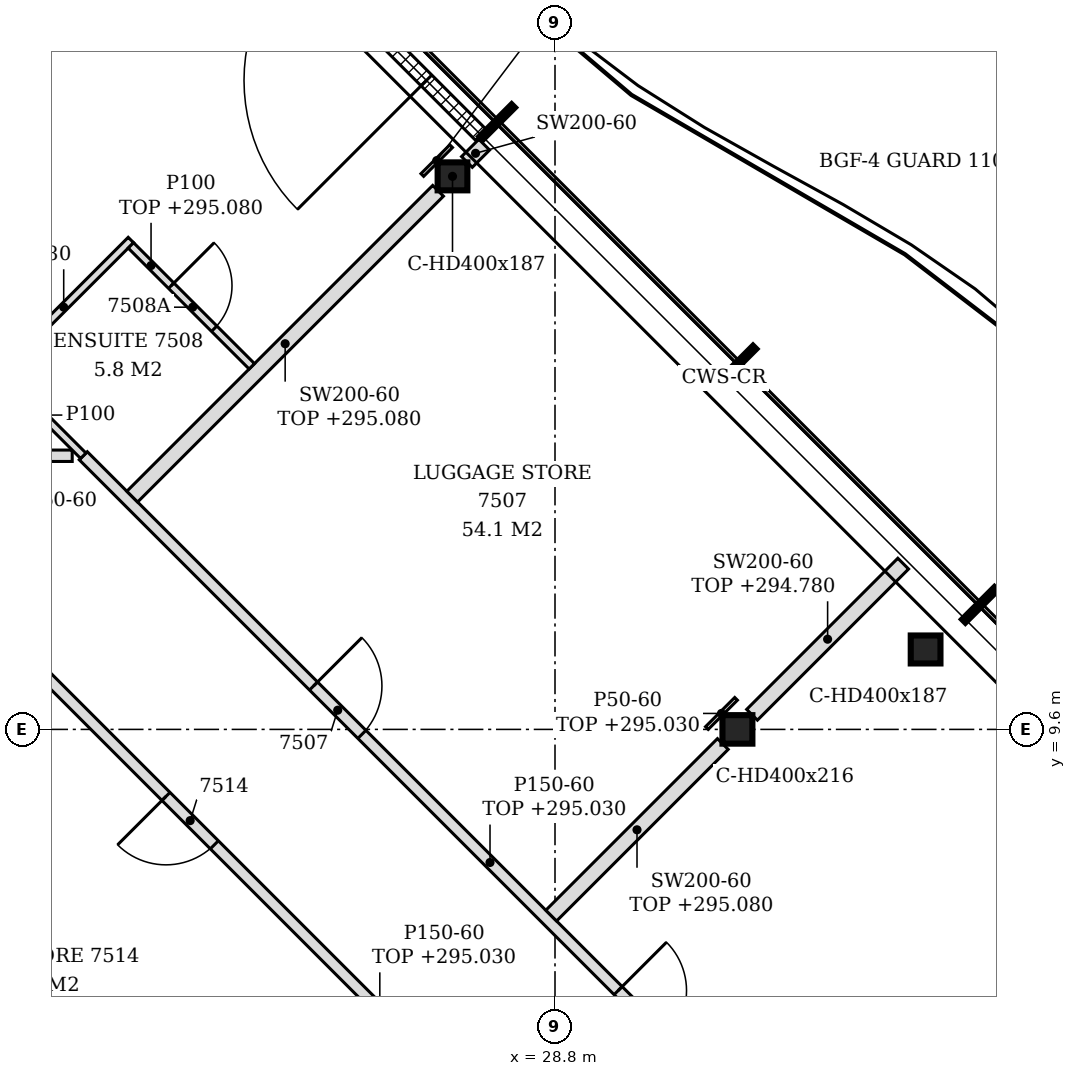
"""IFC4 building model, lengths in metres.
Left out: names, types, materials, properties, quantities, classifications, styles, units other than length and angle.
Written with IfcOpenShell. Run it as: python <this file> out.ifc"""

import sys

from ifc_helpers import new_model, si_unit, direction, frame, frame_2d, origin, origin_2d, place, context, subcontext, project, spatial, rectangle, i_section, extrude, element, fill, save


model = new_model("IFC4")
c1 = context("Model", 3, precision=1e-05, world=origin(), true_north=direction((0.0, 1.0)))
c2 = subcontext(c1, "Body", "Model", "MODEL_VIEW")
j1 = project(units=[si_unit("LENGTHUNIT", "METRE"), si_unit("PLANEANGLEUNIT", "RADIAN")], contexts=[c1])
p1 = place(None, origin())
s1 = spatial("IfcSite", under=j1, at=p1, CompositionType="ELEMENT")
p2 = place(p1, origin())
s2 = spatial("IfcBuilding", under=s1, at=p2, CompositionType="ELEMENT")
p3 = place(p2, frame((0.0, 0.0, 292.2)))
s3 = spatial("IfcBuildingStorey", under=s2, at=p3, CompositionType="ELEMENT", Elevation=292.2)
for number, where, z_axis, x_axis in (
    (1, (33.676, 10.652, -0.15), (0.0, 0.0, 1.0), (1.0, 0.0, 0.0)),
    (2, (27.451, 16.876, -0.15), (0.0, 0.0, 1.0), (1.0, 0.0, 0.0)),
):
    element("IfcColumn", number, at=place(p3, frame(where, z_axis=z_axis, x_axis=x_axis)), inside=s3, PredefinedType="COLUMN", context=c2, shape_type="SweptSolid", body=[
        extrude(i_section(OverallWidth=0.391, OverallDepth=0.368, WebThickness=0.015, FlangeThickness=0.024, FilletRadius=0.015, at=origin_2d()), origin(), (0.0, 0.0, 1.0), 3.55),
    ])
p4 = place(p3, frame((31.2, 9.6, -0.15), z_axis=(0.0, 0.0, 1.0), x_axis=(1.0, 0.0, 0.0)))
e3 = element("IfcColumn", 3, at=p4, inside=s3, PredefinedType="COLUMN", context=c2, shape_type="SweptSolid", body=[
    extrude(i_section(OverallWidth=0.394, OverallDepth=0.375, WebThickness=0.017, FlangeThickness=0.028, FilletRadius=0.015, at=origin_2d()), origin(), (0.0, 0.0, 1.0), 3.55),
])
p5 = place(p3, frame((27.826, 17.42, 0.0), z_axis=(0.0, 0.0, 1.0), x_axis=(-0.707079231393, 0.707134329907, 0.0)))
e4 = element("IfcWall", 4, at=p5, inside=s3, PredefinedType="NOTDEFINED", context=c2, shape_type="SweptSolid", body=[
    extrude(rectangle(XDim=4.431, YDim=0.2, at=frame_2d((2.215, 0.0))), origin(), (0.0, 0.0, 1.0), 3.4),
])
p6 = place(p5, frame((1.015, 0.0, 0.0)))
e5 = element("IfcOpeningElement", 5, at=p6, cuts=e4, PredefinedType="OPENING", context=c2, shape_type="SweptSolid", body=[
    extrude(rectangle(XDim=2.4, YDim=2.4, at=frame_2d((1.2, 1.2))), frame((0.0, 0.11, 0.0), z_axis=(0.0, -1.0, 0.0), x_axis=(1.0, 0.0, 0.0)), (0.0, 0.0, 1.0), 0.22),
])
p7 = place(p3, frame((28.672, 3.728, 0.0), z_axis=(0.0, 0.0, 1.0), x_axis=(-0.707106781187, 0.707106781187, 0.0)))
e6 = element("IfcWall", 6, at=p7, inside=s3, PredefinedType="PARTITIONING", context=c2, shape_type="SweptSolid", body=[
    extrude(rectangle(XDim=13.124, YDim=0.15, at=frame_2d((6.562, 0.0))), origin(), (0.0, 0.0, 1.0), 2.83),
])
p8 = place(p7, frame((6.157, 0.0, 0.0)))
e7 = element("IfcOpeningElement", 7, at=p8, cuts=e6, PredefinedType="OPENING", context=c2, shape_type="SweptSolid", body=[
    extrude(rectangle(XDim=0.9, YDim=2.1, at=frame_2d((0.45, 1.05))), frame((0.0, 0.085, 0.0), z_axis=(0.0, -1.0, 0.0), x_axis=(1.0, 0.0, 0.0)), (0.0, 0.0, 1.0), 0.17),
])
p9 = place(p3, frame((31.072, 4.722, 0.0), z_axis=(0.0, 0.0, 1.0), x_axis=(-0.707106781187, 0.707106781187, 0.0)))
e8 = element("IfcWall", 8, at=p9, inside=s3, PredefinedType="PARTITIONING", context=c2, shape_type="SweptSolid", body=[
    extrude(rectangle(XDim=11.99, YDim=0.15, at=frame_2d((5.995, 0.0))), origin(), (0.0, 0.0, 1.0), 2.83),
])
p10 = place(p9, frame((1.139, 0.0, 0.0)))
e9 = element("IfcOpeningElement", 9, at=p10, cuts=e8, PredefinedType="OPENING", context=c2, shape_type="SweptSolid", body=[
    extrude(rectangle(XDim=0.9, YDim=2.1, at=frame_2d((0.45, 1.05))), frame((0.0, 0.085, 0.0), z_axis=(0.0, -1.0, 0.0), x_axis=(1.0, 0.0, 0.0)), (0.0, 0.0, 1.0), 0.17),
])
p11 = place(p9, frame((6.806, 0.0, 0.0)))
e10 = element("IfcOpeningElement", 10, at=p11, cuts=e8, PredefinedType="OPENING", context=c2, shape_type="SweptSolid", body=[
    extrude(rectangle(XDim=0.9, YDim=2.1, at=frame_2d((0.45, 1.05))), frame((0.0, 0.085, 0.0), z_axis=(0.0, -1.0, 0.0), x_axis=(1.0, 0.0, 0.0)), (0.0, 0.0, 1.0), 0.17),
])
p12 = place(p3, frame((28.75, 7.15, 0.0), z_axis=(0.0, 0.0, 1.0), x_axis=(0.707106781187, 0.707106781187, 0.0)))
e11 = element("IfcWall", 11, at=p12, inside=s3, PredefinedType="PARTITIONING", context=c2, shape_type="SweptSolid", body=[
    extrude(rectangle(XDim=3.193, YDim=0.2, at=frame_2d((1.597, 0.0))), origin(), (0.0, 0.0, 1.0), 2.88),
])
p13 = place(p3, frame((31.392, 9.792, 0.0), z_axis=(0.0, 0.0, 1.0), x_axis=(0.707106781187, 0.707106781187, 0.0)))
e12 = element("IfcWall", 12, at=p13, inside=s3, PredefinedType="PARTITIONING", context=c2, shape_type="SweptSolid", body=[
    extrude(rectangle(XDim=2.812, YDim=0.2, at=frame_2d((1.406, 0.0))), origin(), (0.0, 0.0, 1.0), 2.58),
])
p14 = place(p3, frame((23.238, 12.662, 0.0), z_axis=(0.0, 0.0, 1.0), x_axis=(0.707106781187, 0.707106781187, 0.0)))
e13 = element("IfcWall", 13, at=p14, inside=s3, PredefinedType="PARTITIONING", context=c2, shape_type="SweptSolid", body=[
    extrude(rectangle(XDim=5.69, YDim=0.2, at=frame_2d((2.845, 0.0))), origin(), (0.0, 0.0, 1.0), 2.88),
])
p15 = place(p3, frame((19.397, 13.2, 0.0), z_axis=(0.0, 0.0, 1.0), x_axis=(1.0, 0.0, 0.0)))
e14 = element("IfcWall", 14, at=p15, inside=s3, PredefinedType="PARTITIONING", context=c2, shape_type="SweptSolid", body=[
    extrude(rectangle(XDim=3.051, YDim=0.15, at=frame_2d((1.526, 0.0))), origin(), (0.0, 0.0, 1.0), 3.4),
])
p16 = place(p15, frame((1.05, 0.0, 0.0)))
e15 = element("IfcOpeningElement", 15, at=p16, cuts=e14, PredefinedType="OPENING", context=c2, shape_type="SweptSolid", body=[
    extrude(rectangle(XDim=0.9, YDim=2.1, at=frame_2d((0.45, 1.05))), frame((0.0, 0.085, 0.0), z_axis=(0.0, -1.0, 0.0), x_axis=(1.0, 0.0, 0.0)), (0.0, 0.0, 1.0), 0.17),
])
p17 = place(p3, frame((22.594, 13.2, 0.0), z_axis=(0.0, 0.0, 1.0), x_axis=(-0.707106781187, 0.707106781187, 0.0)))
e16 = element("IfcWall", 16, at=p17, inside=s3, PredefinedType="PARTITIONING", context=c2, shape_type="SweptSolid", body=[
    extrude(rectangle(XDim=1.514, YDim=0.1, at=frame_2d((0.757, 0.0))), origin(), (0.0, 0.0, 1.0), 3.4),
])
p18 = place(p3, frame((21.453, 14.271, 0.0), z_axis=(0.0, 0.0, 1.0), x_axis=(0.707057949532, 0.707155609469, 0.0)))
e17 = element("IfcWall", 17, at=p18, inside=s3, PredefinedType="PARTITIONING", context=c2, shape_type="SweptSolid", body=[
    extrude(rectangle(XDim=2.5, YDim=0.1, at=frame_2d((1.25, 0.0))), origin(), (0.0, 0.0, 1.0), 2.88),
])
p19 = place(p3, frame((24.811, 14.377, 0.0), z_axis=(0.0, 0.0, 1.0), x_axis=(-0.707106781187, 0.707106781187, 0.0)))
e18 = element("IfcWall", 18, at=p19, inside=s3, PredefinedType="PARTITIONING", context=c2, shape_type="SweptSolid", body=[
    extrude(rectangle(XDim=2.25, YDim=0.1, at=frame_2d((1.125, 0.0))), origin(), (0.0, 0.0, 1.0), 2.88),
])
p20 = place(p19, frame((0.7, 0.0, 0.0)))
e19 = element("IfcOpeningElement", 19, at=p20, cuts=e18, PredefinedType="OPENING", context=c2, shape_type="SweptSolid", body=[
    extrude(rectangle(XDim=0.8, YDim=2.1, at=frame_2d((0.4, 1.05))), frame((0.0, 0.06, 0.0), z_axis=(0.0, -1.0, 0.0), x_axis=(1.0, 0.0, 0.0)), (0.0, 0.0, 1.0), 0.12),
])
p21 = place(p3, frame((27.641, 17.065, 0.0), z_axis=(0.0, 0.0, 1.0), x_axis=(0.707106781187, 0.707106781187, 0.0)))
e20 = element("IfcWall", 20, at=p21, inside=s3, PredefinedType="PARTITIONING", context=c2, shape_type="SweptSolid", body=[
    extrude(rectangle(XDim=0.322, YDim=0.2, at=frame_2d((0.161, 0.0))), origin(), (0.0, 0.0, 1.0), 3.4),
])
p22 = place(p3, frame((30.798, 9.618, 0.0), z_axis=(0.0, 0.0, 1.0), x_axis=(0.707106781187, 0.707106781187, 0.0)))
e21 = element("IfcWall", 21, at=p22, inside=s3, PredefinedType="PARTITIONING", context=c2, shape_type="SweptSolid", body=[
    extrude(rectangle(XDim=0.544, YDim=0.05, at=frame_2d((0.272, 0.0))), origin(), (0.0, 0.0, 1.0), 2.83),
])
p23 = place(p3, frame((27.054, 16.893, 0.0), z_axis=(0.0, 0.0, 1.0), x_axis=(0.707106781187, 0.707106781187, 0.0)))
e22 = element("IfcWall", 22, at=p23, inside=s3, PredefinedType="PARTITIONING", context=c2, shape_type="SweptSolid", body=[
    extrude(rectangle(XDim=0.537, YDim=0.05, at=frame_2d((0.269, 0.0))), origin(), (0.0, 0.0, 1.0), 2.88),
])
p24 = place(p6, origin())
e23 = element("IfcDoor", 23, at=p24, inside=s3, OperationType="SINGLE_SWING_LEFT", PredefinedType="DOOR", context=c2, shape_type="SweptSolid", body=[
    extrude(rectangle(XDim=2.4, YDim=2.4, at=frame_2d((1.2, 1.2))), frame((0.0, 0.025, 0.0), z_axis=(0.0, -1.0, 0.0), x_axis=(1.0, 0.0, 0.0)), (0.0, 0.0, 1.0), 0.05),
])
fill(e5, e23)
p25 = place(p10, frame((0.9, 0.0, 0.0), z_axis=(0.0, 0.0, 1.0), x_axis=(-1.0, 0.0, 0.0)))
e24 = element("IfcDoor", 24, at=p25, inside=s3, OperationType="SINGLE_SWING_LEFT", PredefinedType="DOOR", context=c2, shape_type="SweptSolid", body=[
    extrude(rectangle(XDim=0.9, YDim=2.1, at=frame_2d((0.45, 1.05))), frame((0.0, 0.025, 0.0), z_axis=(0.0, -1.0, 0.0), x_axis=(1.0, 0.0, 0.0)), (0.0, 0.0, 1.0), 0.05),
])
fill(e9, e24)
p26 = place(p11, frame((0.9, 0.0, 0.0), z_axis=(0.0, 0.0, 1.0), x_axis=(-1.0, 0.0, 0.0)))
e25 = element("IfcDoor", 25, at=p26, inside=s3, OperationType="SINGLE_SWING_LEFT", PredefinedType="DOOR", context=c2, shape_type="SweptSolid", body=[
    extrude(rectangle(XDim=0.9, YDim=2.1, at=frame_2d((0.45, 1.05))), frame((0.0, 0.025, 0.0), z_axis=(0.0, -1.0, 0.0), x_axis=(1.0, 0.0, 0.0)), (0.0, 0.0, 1.0), 0.05),
])
fill(e10, e25)
p27 = place(p20, frame((0.8, 0.0, 0.0), z_axis=(0.0, 0.0, 1.0), x_axis=(-1.0, 0.0, 0.0)))
e26 = element("IfcDoor", 26, at=p27, inside=s3, OperationType="SINGLE_SWING_LEFT", PredefinedType="DOOR", context=c2, shape_type="SweptSolid", body=[
    extrude(rectangle(XDim=0.8, YDim=2.1, at=frame_2d((0.4, 1.05))), frame((0.0, 0.025, 0.0), z_axis=(0.0, -1.0, 0.0), x_axis=(1.0, 0.0, 0.0)), (0.0, 0.0, 1.0), 0.05),
])
fill(e19, e26)
p28 = place(p8, origin())
e27 = element("IfcDoor", 27, at=p28, inside=s3, OperationType="SINGLE_SWING_RIGHT", PredefinedType="DOOR", context=c2, shape_type="SweptSolid", body=[
    extrude(rectangle(XDim=0.9, YDim=2.1, at=frame_2d((0.45, 1.05))), frame((0.0, 0.025, 0.0), z_axis=(0.0, -1.0, 0.0), x_axis=(1.0, 0.0, 0.0)), (0.0, 0.0, 1.0), 0.05),
])
fill(e7, e27)
save(model, sys.argv[1])
